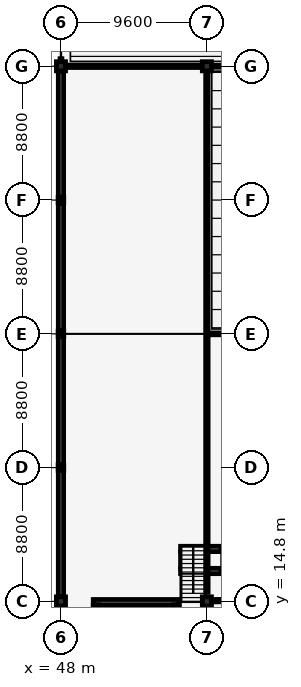
"""IFC4 building model, lengths in metres.
Left out: names, types, materials, properties, quantities, classifications, styles, units other than length and angle.
Written with IfcOpenShell. Run it as: python <this file> out.ifc"""

import sys

from ifc_helpers import new_model, si_unit, direction, frame, frame_2d, origin, origin_2d, place, context, subcontext, project, spatial, rectangle, i_section, extrude, element, fill, save


model = new_model("IFC4")
c1 = context("Model", 3, precision=1e-05, world=origin(), true_north=direction((0.0, 1.0)))
c2 = subcontext(c1, "Body", "Model", "MODEL_VIEW")
j1 = project(units=[si_unit("LENGTHUNIT", "METRE"), si_unit("PLANEANGLEUNIT", "RADIAN")], contexts=[c1])
p1 = place(None, origin())
s1 = spatial("IfcSite", under=j1, at=p1, CompositionType="ELEMENT")
p2 = place(p1, origin())
s2 = spatial("IfcBuilding", under=s1, at=p2, CompositionType="ELEMENT")
p3 = place(p2, origin())
s3 = spatial("IfcBuildingStorey", under=s2, at=p3, CompositionType="ELEMENT", Elevation=0.0)
p4 = place(p3, frame((48.0, 14.8, 0.0), z_axis=(0.0, 0.0, 1.0), x_axis=(1.0, 0.0, 0.0)))
e1 = element("IfcColumn", 1, at=p4, inside=s3, PredefinedType="COLUMN", context=c2, shape_type="SweptSolid", body=[
    extrude(rectangle(XDim=0.6, YDim=0.6, at=origin_2d()), origin(), (0.0, 0.0, 1.0), 4.8),
])
for number, where, z_axis, x_axis in (
    (2, (48.0, 23.6, 0.0), (0.0, 0.0, 1.0), (1.0, 0.0, 0.0)),
    (3, (48.0, 32.4, 0.0), (0.0, 0.0, 1.0), (1.0, 0.0, 0.0)),
    (4, (48.0, 41.2, 0.0), (0.0, 0.0, 1.0), (1.0, 0.0, 0.0)),
):
    element("IfcColumn", number, at=place(p3, frame(where, z_axis=z_axis, x_axis=x_axis)), inside=s3, PredefinedType="COLUMN", context=c2, shape_type="SweptSolid", body=[
        extrude(i_section(OverallWidth=0.368, OverallDepth=0.368, WebThickness=0.015, FlangeThickness=0.024, FilletRadius=0.025, at=origin_2d()), origin(), (0.0, 0.0, 1.0), 4.8),
    ])
for number, where, z_axis, x_axis in (
    (5, (48.0, 50.0, 0.0), (0.0, 0.0, 1.0), (1.0, 0.0, 0.0)),
    (6, (57.6, 14.8, 0.0), (0.0, 0.0, 1.0), (1.0, 0.0, 0.0)),
    (7, (57.6, 50.0, 0.0), (0.0, 0.0, 1.0), (1.0, 0.0, 0.0)),
):
    element("IfcColumn", number, at=place(p3, frame(where, z_axis=z_axis, x_axis=x_axis)), inside=s3, PredefinedType="COLUMN", context=c2, shape_type="SweptSolid", body=[
        extrude(rectangle(XDim=0.6, YDim=0.6, at=origin_2d()), origin(), (0.0, 0.0, 1.0), 4.8),
    ])
p5 = place(p3, frame((48.0, 15.1, 0.0), z_axis=(0.0, 0.0, 1.0), x_axis=(0.0, 1.0, 0.0)))
e8 = element("IfcWall", 8, at=p5, inside=s3, PredefinedType="SOLIDWALL", context=c2, shape_type="SweptSolid", body=[
    extrude(rectangle(XDim=8.316, YDim=0.35, at=frame_2d((4.158, 0.0))), origin(), (0.0, 0.0, 1.0), 4.1),
])
p6 = place(p5, frame((1.4, 0.0, 0.0)))
e9 = element("IfcOpeningElement", 9, at=p6, cuts=e8, PredefinedType="OPENING", context=c2, shape_type="SweptSolid", body=[
    extrude(rectangle(XDim=1.88, YDim=2.31, at=frame_2d((0.94, 1.155))), frame((0.0, 0.185, 0.0), z_axis=(0.0, -1.0, 0.0), x_axis=(1.0, 0.0, 0.0)), (0.0, 0.0, 1.0), 0.37),
])
p7 = place(p5, frame((4.6, 0.0, 0.0)))
e10 = element("IfcOpeningElement", 10, at=p7, cuts=e8, PredefinedType="OPENING", context=c2, shape_type="SweptSolid", body=[
    extrude(rectangle(XDim=1.8, YDim=2.4, at=frame_2d((0.9, 1.2))), frame((0.0, 0.185, 0.0), z_axis=(0.0, -1.0, 0.0), x_axis=(1.0, 0.0, 0.0)), (0.0, 0.0, 1.0), 0.37),
])
p8 = place(p3, frame((48.0, 23.784, 0.0), z_axis=(0.0, 0.0, 1.0), x_axis=(0.0, 1.0, 0.0)))
e11 = element("IfcWall", 11, at=p8, inside=s3, PredefinedType="SOLIDWALL", context=c2, shape_type="SweptSolid", body=[
    extrude(rectangle(XDim=8.432, YDim=0.35, at=frame_2d((4.216, 0.0))), origin(), (0.0, 0.0, 1.0), 4.1),
])
p9 = place(p8, frame((1.4, 0.0, 0.0)))
e12 = element("IfcOpeningElement", 12, at=p9, cuts=e11, PredefinedType="OPENING", context=c2, shape_type="SweptSolid", body=[
    extrude(rectangle(XDim=1.96, YDim=2.37, at=frame_2d((0.98, 1.185))), frame((0.0, 0.185, 0.0), z_axis=(0.0, -1.0, 0.0), x_axis=(1.0, 0.0, 0.0)), (0.0, 0.0, 1.0), 0.37),
])
p10 = place(p8, frame((4.6, 0.0, 0.0)))
e13 = element("IfcOpeningElement", 13, at=p10, cuts=e11, PredefinedType="OPENING", context=c2, shape_type="SweptSolid", body=[
    extrude(rectangle(XDim=1.72, YDim=2.34, at=frame_2d((0.86, 1.17))), frame((0.0, 0.185, 0.0), z_axis=(0.0, -1.0, 0.0), x_axis=(1.0, 0.0, 0.0)), (0.0, 0.0, 1.0), 0.37),
])
p11 = place(p3, frame((48.0, 32.584, 0.0), z_axis=(0.0, 0.0, 1.0), x_axis=(0.0, 1.0, 0.0)))
e14 = element("IfcWall", 14, at=p11, inside=s3, PredefinedType="SOLIDWALL", context=c2, shape_type="SweptSolid", body=[
    extrude(rectangle(XDim=8.432, YDim=0.35, at=frame_2d((4.216, 0.0))), origin(), (0.0, 0.0, 1.0), 4.1),
])
p12 = place(p11, frame((1.4, 0.0, 0.0)))
e15 = element("IfcOpeningElement", 15, at=p12, cuts=e14, PredefinedType="OPENING", context=c2, shape_type="SweptSolid", body=[
    extrude(rectangle(XDim=1.88, YDim=2.31, at=frame_2d((0.94, 1.155))), frame((0.0, 0.185, 0.0), z_axis=(0.0, -1.0, 0.0), x_axis=(1.0, 0.0, 0.0)), (0.0, 0.0, 1.0), 0.37),
])
p13 = place(p11, frame((4.6, 0.0, 0.0)))
e16 = element("IfcOpeningElement", 16, at=p13, cuts=e14, PredefinedType="OPENING", context=c2, shape_type="SweptSolid", body=[
    extrude(rectangle(XDim=1.8, YDim=2.4, at=frame_2d((0.9, 1.2))), frame((0.0, 0.185, 0.0), z_axis=(0.0, -1.0, 0.0), x_axis=(1.0, 0.0, 0.0)), (0.0, 0.0, 1.0), 0.37),
])
p14 = place(p3, frame((48.0, 41.384, 0.0), z_axis=(0.0, 0.0, 1.0), x_axis=(0.0, 1.0, 0.0)))
e17 = element("IfcWall", 17, at=p14, inside=s3, PredefinedType="SOLIDWALL", context=c2, shape_type="SweptSolid", body=[
    extrude(rectangle(XDim=8.316, YDim=0.35, at=frame_2d((4.158, 0.0))), origin(), (0.0, 0.0, 1.0), 4.1),
])
p15 = place(p14, frame((1.4, 0.0, 0.0)))
e18 = element("IfcOpeningElement", 18, at=p15, cuts=e17, PredefinedType="OPENING", context=c2, shape_type="SweptSolid", body=[
    extrude(rectangle(XDim=1.96, YDim=2.37, at=frame_2d((0.98, 1.185))), frame((0.0, 0.185, 0.0), z_axis=(0.0, -1.0, 0.0), x_axis=(1.0, 0.0, 0.0)), (0.0, 0.0, 1.0), 0.37),
])
p16 = place(p14, frame((4.6, 0.0, 0.0)))
e19 = element("IfcOpeningElement", 19, at=p16, cuts=e17, PredefinedType="OPENING", context=c2, shape_type="SweptSolid", body=[
    extrude(rectangle(XDim=1.72, YDim=2.34, at=frame_2d((0.86, 1.17))), frame((0.0, 0.185, 0.0), z_axis=(0.0, -1.0, 0.0), x_axis=(1.0, 0.0, 0.0)), (0.0, 0.0, 1.0), 0.37),
])
p17 = place(p3, frame((50.125, 14.75, 0.0), z_axis=(0.0, 0.0, 1.0), x_axis=(1.0, 0.0, 0.0)))
e20 = element("IfcWall", 20, at=p17, inside=s3, PredefinedType="SHEAR", context=c2, shape_type="SweptSolid", body=[
    extrude(rectangle(XDim=5.65, YDim=0.35, at=frame_2d((2.825, 0.0))), origin(), (0.0, 0.0, 1.0), 4.55),
])
p18 = place(p3, frame((50.3, 6.625, 0.0), z_axis=(0.0, 0.0, 1.0), x_axis=(0.0, 1.0, 0.0)))
e21 = element("IfcWall", 21, at=p18, inside=s3, PredefinedType="SHEAR", context=c2, shape_type="SweptSolid", body=[
    extrude(rectangle(XDim=7.95, YDim=0.35, at=frame_2d((3.975, 0.0))), origin(), (0.0, 0.0, 1.0), 4.55),
])
p19 = place(p3, frame((55.6, 14.575, 0.0), z_axis=(0.0, 0.0, 1.0), x_axis=(0.0, -1.0, 0.0)))
e22 = element("IfcWall", 22, at=p19, inside=s3, PredefinedType="SHEAR", context=c2, shape_type="SweptSolid", body=[
    extrude(rectangle(XDim=7.95, YDim=0.35, at=frame_2d((3.975, 0.0))), origin(), (0.0, 0.0, 1.0), 4.55),
])
p20 = place(p19, frame((5.68, 0.0, 0.0)))
e23 = element("IfcOpeningElement", 23, at=p20, cuts=e22, PredefinedType="OPENING", context=c2, shape_type="SweptSolid", body=[
    extrude(rectangle(XDim=2.05, YDim=2.15, at=frame_2d((1.025, 1.075))), frame((0.0, 0.185, 0.0), z_axis=(0.0, -1.0, 0.0), x_axis=(1.0, 0.0, 0.0)), (0.0, 0.0, 1.0), 0.37),
])
for number, where, z_axis, x_axis in (
    (24, (55.875, 16.8, 0.0), (0.0, 0.0, 1.0), (1.0, 0.0, 0.0)),
    (25, (55.875, 18.25, 0.0), (0.0, 0.0, 1.0), (1.0, 0.0, 0.0)),
):
    element("IfcWall", number, at=place(p3, frame(where, z_axis=z_axis, x_axis=x_axis)), inside=s3, PredefinedType="SHEAR", context=c2, shape_type="SweptSolid", body=[
        extrude(rectangle(XDim=2.67, YDim=0.35, at=frame_2d((1.335, 0.0))), origin(), (0.0, 0.0, 1.0), 2.205),
    ])
p21 = place(p3, frame((56.05, 16.975, 0.0), z_axis=(0.0, 0.0, 1.0), x_axis=(0.0, 1.0, 0.0)))
e26 = element("IfcWall", 26, at=p21, inside=s3, PredefinedType="SHEAR", context=c2, shape_type="SweptSolid", body=[
    extrude(rectangle(XDim=1.1, YDim=0.35, at=frame_2d((0.55, 0.0))), origin(), (0.0, 0.0, 1.0), 2.205),
])
p22 = place(p3, frame((57.7, 32.4, 0.0), z_axis=(0.0, 0.0, 1.0), x_axis=(1.0, 0.0, 0.0)))
e27 = element("IfcWall", 27, at=p22, inside=s3, PredefinedType="PARTITIONING", context=c2, shape_type="SweptSolid", body=[
    extrude(rectangle(XDim=28.6, YDim=0.125, at=frame_2d((14.3, 0.0))), origin(), (0.0, 0.0, 1.0), 4.42),
])
p23 = place(p3, frame((57.6, 15.4, 0.0), z_axis=(0.0, 0.0, 1.0), x_axis=(0.0, 1.0, 0.0)))
e28 = element("IfcWall", 28, at=p23, inside=s3, PredefinedType="PARTITIONING", context=c2, shape_type="SweptSolid", body=[
    extrude(rectangle(XDim=16.9, YDim=0.16, at=frame_2d((8.45, 0.0))), origin(), (0.0, 0.0, 1.0), 4.42),
])
p24 = place(p23, frame((7.55, 0.0, 0.0)))
e29 = element("IfcOpeningElement", 29, at=p24, cuts=e28, PredefinedType="OPENING", context=c2, shape_type="SweptSolid", body=[
    extrude(rectangle(XDim=1.8, YDim=2.15, at=frame_2d((0.9, 1.075))), frame((0.0, 0.09, 0.0), z_axis=(0.0, -1.0, 0.0), x_axis=(1.0, 0.0, 0.0)), (0.0, 0.0, 1.0), 0.18),
])
p25 = place(p3, frame((57.7, 14.85, 0.0), z_axis=(0.0, 0.0, 1.0), x_axis=(1.0, 0.0, 0.0)))
e30 = element("IfcWall", 30, at=p25, inside=s3, PredefinedType="PARTITIONING", context=c2, shape_type="SweptSolid", body=[
    extrude(rectangle(XDim=4.3, YDim=0.16, at=frame_2d((2.15, 0.0))), origin(), (0.0, 0.0, 1.0), 3.925),
])
p26 = place(p25, frame((1.25, 0.0, 0.0)))
e31 = element("IfcOpeningElement", 31, at=p26, cuts=e30, PredefinedType="OPENING", context=c2, shape_type="SweptSolid", body=[
    extrude(rectangle(XDim=1.8, YDim=2.15, at=frame_2d((0.9, 1.075))), frame((0.0, 0.09, 0.0), z_axis=(0.0, -1.0, 0.0), x_axis=(1.0, 0.0, 0.0)), (0.0, 0.0, 1.0), 0.18),
])
p27 = place(p3, frame((57.7, 50.0, 0.0), z_axis=(0.0, 0.0, 1.0), x_axis=(1.0, 0.0, 0.0)))
e32 = element("IfcWall", 32, at=p27, inside=s3, PredefinedType="PARTITIONING", context=c2, shape_type="SweptSolid", body=[
    extrude(rectangle(XDim=5.5, YDim=0.125, at=frame_2d((2.75, 0.0))), origin(), (0.0, 0.0, 1.0), 3.925),
])
p28 = place(p3, frame((57.6, 32.5, 0.0), z_axis=(0.0, 0.0, 1.0), x_axis=(0.0, 1.0, 0.0)))
e33 = element("IfcWall", 33, at=p28, inside=s3, PredefinedType="PARTITIONING", context=c2, shape_type="SweptSolid", body=[
    extrude(rectangle(XDim=17.45, YDim=0.16, at=frame_2d((8.725, 0.0))), origin(), (0.0, 0.0, 1.0), 4.42),
])
p29 = place(p28, frame((7.825, 0.0, 0.0)))
e34 = element("IfcOpeningElement", 34, at=p29, cuts=e33, PredefinedType="OPENING", context=c2, shape_type="SweptSolid", body=[
    extrude(rectangle(XDim=1.8, YDim=2.15, at=frame_2d((0.9, 1.075))), frame((0.0, 0.09, 0.0), z_axis=(0.0, -1.0, 0.0), x_axis=(1.0, 0.0, 0.0)), (0.0, 0.0, 1.0), 0.18),
])
p30 = place(p3, frame((48.05, 50.0, 0.0), z_axis=(0.0, 0.0, 1.0), x_axis=(1.0, 0.0, 0.0)))
e35 = element("IfcWall", 35, at=p30, inside=s3, PredefinedType="PARTITIONING", context=c2, shape_type="SweptSolid", body=[
    extrude(rectangle(XDim=9.45, YDim=0.16, at=frame_2d((4.725, 0.0))), origin(), (0.0, 0.0, 1.0), 3.925),
])
p31 = place(p30, frame((3.825, 0.0, 0.0)))
e36 = element("IfcOpeningElement", 36, at=p31, cuts=e35, PredefinedType="OPENING", context=c2, shape_type="SweptSolid", body=[
    extrude(rectangle(XDim=1.8, YDim=2.15, at=frame_2d((0.9, 1.075))), frame((0.0, 0.09, 0.0), z_axis=(0.0, -1.0, 0.0), x_axis=(1.0, 0.0, 0.0)), (0.0, 0.0, 1.0), 0.18),
])
p32 = place(p6, origin())
e37 = element("IfcDoor", 37, at=p32, inside=s3, OperationType="DOUBLE_DOOR_SINGLE_SWING", PredefinedType="DOOR", context=c2, shape_type="SweptSolid", body=[
    extrude(rectangle(XDim=1.88, YDim=2.31, at=frame_2d((0.94, 1.155))), frame((0.0, 0.025, 0.0), z_axis=(0.0, -1.0, 0.0), x_axis=(1.0, 0.0, 0.0)), (0.0, 0.0, 1.0), 0.05),
])
fill(e9, e37)
p33 = place(p7, origin())
e38 = element("IfcDoor", 38, at=p33, inside=s3, OperationType="DOUBLE_DOOR_SINGLE_SWING", PredefinedType="DOOR", context=c2, shape_type="SweptSolid", body=[
    extrude(rectangle(XDim=1.8, YDim=2.4, at=frame_2d((0.9, 1.2))), frame((0.0, 0.025, 0.0), z_axis=(0.0, -1.0, 0.0), x_axis=(1.0, 0.0, 0.0)), (0.0, 0.0, 1.0), 0.05),
])
fill(e10, e38)
p34 = place(p9, origin())
e39 = element("IfcDoor", 39, at=p34, inside=s3, OperationType="DOUBLE_DOOR_SINGLE_SWING", PredefinedType="DOOR", context=c2, shape_type="SweptSolid", body=[
    extrude(rectangle(XDim=1.96, YDim=2.37, at=frame_2d((0.98, 1.185))), frame((0.0, 0.025, 0.0), z_axis=(0.0, -1.0, 0.0), x_axis=(1.0, 0.0, 0.0)), (0.0, 0.0, 1.0), 0.05),
])
fill(e12, e39)
p35 = place(p10, origin())
e40 = element("IfcDoor", 40, at=p35, inside=s3, OperationType="DOUBLE_DOOR_SINGLE_SWING", PredefinedType="DOOR", context=c2, shape_type="SweptSolid", body=[
    extrude(rectangle(XDim=1.72, YDim=2.34, at=frame_2d((0.86, 1.17))), frame((0.0, 0.025, 0.0), z_axis=(0.0, -1.0, 0.0), x_axis=(1.0, 0.0, 0.0)), (0.0, 0.0, 1.0), 0.05),
])
fill(e13, e40)
p36 = place(p12, origin())
e41 = element("IfcDoor", 41, at=p36, inside=s3, OperationType="DOUBLE_DOOR_SINGLE_SWING", PredefinedType="DOOR", context=c2, shape_type="SweptSolid", body=[
    extrude(rectangle(XDim=1.88, YDim=2.31, at=frame_2d((0.94, 1.155))), frame((0.0, 0.025, 0.0), z_axis=(0.0, -1.0, 0.0), x_axis=(1.0, 0.0, 0.0)), (0.0, 0.0, 1.0), 0.05),
])
fill(e15, e41)
p37 = place(p13, origin())
e42 = element("IfcDoor", 42, at=p37, inside=s3, OperationType="DOUBLE_DOOR_SINGLE_SWING", PredefinedType="DOOR", context=c2, shape_type="SweptSolid", body=[
    extrude(rectangle(XDim=1.8, YDim=2.4, at=frame_2d((0.9, 1.2))), frame((0.0, 0.025, 0.0), z_axis=(0.0, -1.0, 0.0), x_axis=(1.0, 0.0, 0.0)), (0.0, 0.0, 1.0), 0.05),
])
fill(e16, e42)
p38 = place(p15, origin())
e43 = element("IfcDoor", 43, at=p38, inside=s3, OperationType="DOUBLE_DOOR_SINGLE_SWING", PredefinedType="DOOR", context=c2, shape_type="SweptSolid", body=[
    extrude(rectangle(XDim=1.96, YDim=2.37, at=frame_2d((0.98, 1.185))), frame((0.0, 0.025, 0.0), z_axis=(0.0, -1.0, 0.0), x_axis=(1.0, 0.0, 0.0)), (0.0, 0.0, 1.0), 0.05),
])
fill(e18, e43)
p39 = place(p16, origin())
e44 = element("IfcDoor", 44, at=p39, inside=s3, OperationType="DOUBLE_DOOR_SINGLE_SWING", PredefinedType="DOOR", context=c2, shape_type="SweptSolid", body=[
    extrude(rectangle(XDim=1.72, YDim=2.34, at=frame_2d((0.86, 1.17))), frame((0.0, 0.025, 0.0), z_axis=(0.0, -1.0, 0.0), x_axis=(1.0, 0.0, 0.0)), (0.0, 0.0, 1.0), 0.05),
])
fill(e19, e44)
p40 = place(p24, origin())
e45 = element("IfcDoor", 45, at=p40, inside=s3, OperationType="DOUBLE_DOOR_SINGLE_SWING", PredefinedType="DOOR", context=c2, shape_type="SweptSolid", body=[
    extrude(rectangle(XDim=1.8, YDim=2.15, at=frame_2d((0.9, 1.075))), frame((0.0, 0.025, 0.0), z_axis=(0.0, -1.0, 0.0), x_axis=(1.0, 0.0, 0.0)), (0.0, 0.0, 1.0), 0.05),
])
fill(e29, e45)
p41 = place(p29, origin())
e46 = element("IfcDoor", 46, at=p41, inside=s3, OperationType="DOUBLE_DOOR_SINGLE_SWING", PredefinedType="DOOR", context=c2, shape_type="SweptSolid", body=[
    extrude(rectangle(XDim=1.8, YDim=2.15, at=frame_2d((0.9, 1.075))), frame((0.0, 0.025, 0.0), z_axis=(0.0, -1.0, 0.0), x_axis=(1.0, 0.0, 0.0)), (0.0, 0.0, 1.0), 0.05),
])
fill(e34, e46)
p42 = place(p31, origin())
e47 = element("IfcDoor", 47, at=p42, inside=s3, OperationType="DOUBLE_DOOR_SINGLE_SWING", PredefinedType="DOOR", context=c2, shape_type="SweptSolid", body=[
    extrude(rectangle(XDim=1.8, YDim=2.15, at=frame_2d((0.9, 1.075))), frame((0.0, 0.025, 0.0), z_axis=(0.0, -1.0, 0.0), x_axis=(1.0, 0.0, 0.0)), (0.0, 0.0, 1.0), 0.05),
])
fill(e36, e47)
save(model, sys.argv[1])
